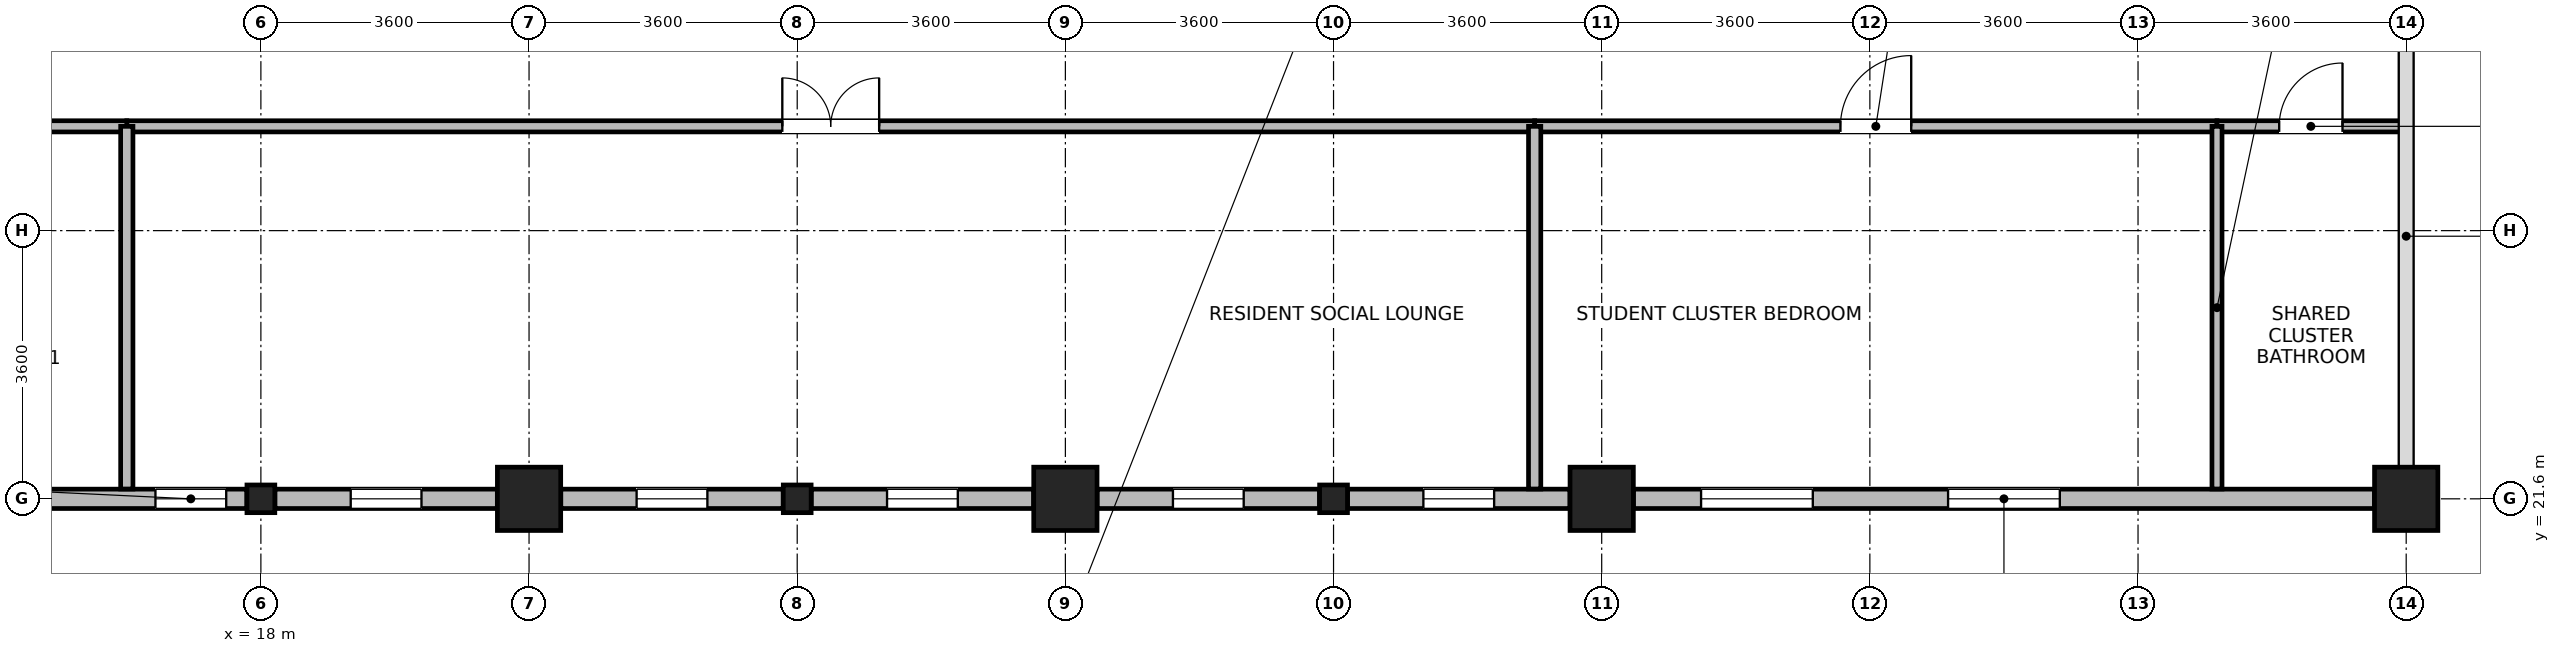
"""IFC4 building model, lengths in metres.
Left out: names, types, materials, properties, quantities, classifications, styles, units other than length and angle.
Written with IfcOpenShell. Run it as: python <this file> out.ifc"""

import sys

from ifc_helpers import new_model, si_unit, direction, frame, frame_2d, origin, origin_2d, place, context, subcontext, project, spatial, rectangle, i_section, extrude, source, transform, mapped, element, fill, save


model = new_model("IFC4")
c1 = context("Model", 3, precision=1e-05, world=origin(), true_north=direction((0.0, 1.0)))
c2 = subcontext(c1, "Body", "Model", "MODEL_VIEW")
j1 = project(units=[si_unit("LENGTHUNIT", "METRE"), si_unit("PLANEANGLEUNIT", "RADIAN")], contexts=[c1])
p1 = place(None, origin())
s1 = spatial("IfcSite", under=j1, at=p1, CompositionType="ELEMENT")
p2 = place(p1, origin())
s2 = spatial("IfcBuilding", under=s1, at=p2, CompositionType="ELEMENT")
p3 = place(p2, frame((0.0, 0.0, 275.8)))
s3 = spatial("IfcBuildingStorey", under=s2, at=p3, CompositionType="ELEMENT", Elevation=275.8)
m1 = source(origin(), c2, "Body", "SweptSolid", [
    extrude(rectangle(XDim=0.85, YDim=0.85, at=origin_2d()), origin(), (0.0, 0.0, 1.0), 3.7),
])
for number, where, z_axis, x_axis in (
    (1, (21.6, 21.6, 0.0), (0.0, 0.0, 1.0), (1.0, 0.0, 0.0)),
    (2, (28.8, 21.6, 0.0), (0.0, 0.0, 1.0), (1.0, 0.0, 0.0)),
    (3, (36.0, 21.6, 0.0), (0.0, 0.0, 1.0), (1.0, 0.0, 0.0)),
    (4, (46.8, 21.6, 0.0), (0.0, 0.0, 1.0), (1.0, 0.0, 0.0)),
):
    element("IfcColumn", number, at=place(p3, frame(where, z_axis=z_axis, x_axis=x_axis)), inside=s3, PredefinedType="COLUMN", context=c2, shape_type="MappedRepresentation", body=[
        mapped(m1, transform((0.0, 0.0, 0.0), x_axis=(1.0, 0.0, 0.0), y_axis=(0.0, 1.0, 0.0), z_axis=(0.0, 0.0, 1.0), scale=1.0)),
    ])
m2 = source(origin(), c2, "Body", "SweptSolid", [
    extrude(i_section(OverallWidth=0.374, OverallDepth=0.372, WebThickness=0.015, FlangeThickness=0.026, FilletRadius=0.015, at=origin_2d()), origin(), (0.0, 0.0, 1.0), 3.7),
])
for number, where, z_axis, x_axis in (
    (5, (18.0, 21.6, 0.0), (0.0, 0.0, 1.0), (1.0, 0.0, 0.0)),
    (6, (25.2, 21.6, 0.0), (0.0, 0.0, 1.0), (1.0, 0.0, 0.0)),
    (7, (32.4, 21.6, 0.0), (0.0, 0.0, 1.0), (1.0, 0.0, 0.0)),
):
    element("IfcColumn", number, at=place(p3, frame(where, z_axis=z_axis, x_axis=x_axis)), inside=s3, PredefinedType="COLUMN", context=c2, shape_type="MappedRepresentation", body=[
        mapped(m2, transform((0.0, 0.0, 0.0), x_axis=(1.0, 0.0, 0.0), y_axis=(0.0, 1.0, 0.0), z_axis=(0.0, 0.0, 1.0), scale=1.0)),
    ])
p4 = place(p3, frame((17.812, 21.6, 0.0), z_axis=(0.0, 0.0, 1.0), x_axis=(-1.0, 0.0, 0.0)))
e8 = element("IfcWall", 8, at=p4, inside=s3, PredefinedType="STANDARD", context=c2, shape_type="SweptSolid", body=[
    extrude(rectangle(XDim=2.986, YDim=0.26, at=frame_2d((1.493, 0.0))), origin(), (0.0, 0.0, 1.0), 3.055),
])
p5 = place(p4, frame((0.278, 0.0, 0.85)))
e9 = element("IfcOpeningElement", 9, at=p5, cuts=e8, PredefinedType="OPENING", context=c2, shape_type="SweptSolid", body=[
    extrude(rectangle(XDim=0.95, YDim=1.75, at=frame_2d((0.475, 0.875))), frame((0.0, 0.14, 0.0), z_axis=(0.0, -1.0, 0.0), x_axis=(1.0, 0.0, 0.0)), (0.0, 0.0, 1.0), 0.28),
])
p6 = place(p3, frame((21.174, 21.6, 0.0), z_axis=(0.0, 0.0, 1.0), x_axis=(-1.0, 0.0, 0.0)))
e10 = element("IfcWall", 10, at=p6, inside=s3, PredefinedType="STANDARD", context=c2, shape_type="SweptSolid", body=[
    extrude(rectangle(XDim=2.986, YDim=0.26, at=frame_2d((1.493, 0.0))), origin(), (0.0, 0.0, 1.0), 3.055),
])
p7 = place(p6, frame((1.018, 0.0, 0.85)))
e11 = element("IfcOpeningElement", 11, at=p7, cuts=e10, PredefinedType="OPENING", context=c2, shape_type="SweptSolid", body=[
    extrude(rectangle(XDim=0.95, YDim=1.75, at=frame_2d((0.475, 0.875))), frame((0.0, 0.14, 0.0), z_axis=(0.0, -1.0, 0.0), x_axis=(1.0, 0.0, 0.0)), (0.0, 0.0, 1.0), 0.28),
])
p8 = place(p3, frame((25.012, 21.6, 0.0), z_axis=(0.0, 0.0, 1.0), x_axis=(-1.0, 0.0, 0.0)))
e12 = element("IfcWall", 12, at=p8, inside=s3, PredefinedType="STANDARD", context=c2, shape_type="SweptSolid", body=[
    extrude(rectangle(XDim=2.986, YDim=0.26, at=frame_2d((1.493, 0.0))), origin(), (0.0, 0.0, 1.0), 3.055),
])
p9 = place(p8, frame((1.018, 0.0, 0.85)))
e13 = element("IfcOpeningElement", 13, at=p9, cuts=e12, PredefinedType="OPENING", context=c2, shape_type="SweptSolid", body=[
    extrude(rectangle(XDim=0.95, YDim=1.75, at=frame_2d((0.475, 0.875))), frame((0.0, 0.14, 0.0), z_axis=(0.0, -1.0, 0.0), x_axis=(1.0, 0.0, 0.0)), (0.0, 0.0, 1.0), 0.28),
])
p10 = place(p3, frame((28.374, 21.6, 0.0), z_axis=(0.0, 0.0, 1.0), x_axis=(-1.0, 0.0, 0.0)))
e14 = element("IfcWall", 14, at=p10, inside=s3, PredefinedType="STANDARD", context=c2, shape_type="SweptSolid", body=[
    extrude(rectangle(XDim=2.986, YDim=0.26, at=frame_2d((1.493, 0.0))), origin(), (0.0, 0.0, 1.0), 3.055),
])
p11 = place(p10, frame((1.018, 0.0, 0.85)))
e15 = element("IfcOpeningElement", 15, at=p11, cuts=e14, PredefinedType="OPENING", context=c2, shape_type="SweptSolid", body=[
    extrude(rectangle(XDim=0.95, YDim=1.75, at=frame_2d((0.475, 0.875))), frame((0.0, 0.14, 0.0), z_axis=(0.0, -1.0, 0.0), x_axis=(1.0, 0.0, 0.0)), (0.0, 0.0, 1.0), 0.28),
])
p12 = place(p3, frame((32.212, 21.6, 0.0), z_axis=(0.0, 0.0, 1.0), x_axis=(-1.0, 0.0, 0.0)))
e16 = element("IfcWall", 16, at=p12, inside=s3, PredefinedType="STANDARD", context=c2, shape_type="SweptSolid", body=[
    extrude(rectangle(XDim=2.986, YDim=0.26, at=frame_2d((1.493, 0.0))), origin(), (0.0, 0.0, 1.0), 3.055),
])
p13 = place(p12, frame((1.018, 0.0, 0.85)))
e17 = element("IfcOpeningElement", 17, at=p13, cuts=e16, PredefinedType="OPENING", context=c2, shape_type="SweptSolid", body=[
    extrude(rectangle(XDim=0.95, YDim=1.75, at=frame_2d((0.475, 0.875))), frame((0.0, 0.14, 0.0), z_axis=(0.0, -1.0, 0.0), x_axis=(1.0, 0.0, 0.0)), (0.0, 0.0, 1.0), 0.28),
])
p14 = place(p3, frame((35.574, 21.6, 0.0), z_axis=(0.0, 0.0, 1.0), x_axis=(-1.0, 0.0, 0.0)))
e18 = element("IfcWall", 18, at=p14, inside=s3, PredefinedType="STANDARD", context=c2, shape_type="SweptSolid", body=[
    extrude(rectangle(XDim=2.986, YDim=0.26, at=frame_2d((1.493, 0.0))), origin(), (0.0, 0.0, 1.0), 3.055),
])
p15 = place(p14, frame((1.018, 0.0, 0.85)))
e19 = element("IfcOpeningElement", 19, at=p15, cuts=e18, PredefinedType="OPENING", context=c2, shape_type="SweptSolid", body=[
    extrude(rectangle(XDim=0.95, YDim=1.75, at=frame_2d((0.475, 0.875))), frame((0.0, 0.14, 0.0), z_axis=(0.0, -1.0, 0.0), x_axis=(1.0, 0.0, 0.0)), (0.0, 0.0, 1.0), 0.28),
])
p16 = place(p3, frame((46.374, 21.6, 0.0), z_axis=(0.0, 0.0, 1.0), x_axis=(-1.0, 0.0, 0.0)))
e20 = element("IfcWall", 20, at=p16, inside=s3, PredefinedType="STANDARD", context=c2, shape_type="SweptSolid", body=[
    extrude(rectangle(XDim=9.948, YDim=0.26, at=frame_2d((4.974, 0.0))), origin(), (0.0, 0.0, 1.0), 3.055),
])
p17 = place(p16, frame((4.224, 0.0, 0.85)))
e21 = element("IfcOpeningElement", 21, at=p17, cuts=e20, PredefinedType="OPENING", context=c2, shape_type="SweptSolid", body=[
    extrude(rectangle(XDim=1.5, YDim=1.85, at=frame_2d((0.75, 0.925))), frame((0.0, 0.14, 0.0), z_axis=(0.0, -1.0, 0.0), x_axis=(1.0, 0.0, 0.0)), (0.0, 0.0, 1.0), 0.28),
])
p18 = place(p16, frame((7.54, 0.0, 0.85)))
e22 = element("IfcOpeningElement", 22, at=p18, cuts=e20, PredefinedType="OPENING", context=c2, shape_type="SweptSolid", body=[
    extrude(rectangle(XDim=1.5, YDim=1.85, at=frame_2d((0.75, 0.925))), frame((0.0, 0.14, 0.0), z_axis=(0.0, -1.0, 0.0), x_axis=(1.0, 0.0, 0.0)), (0.0, 0.0, 1.0), 0.28),
])
p19 = place(p3, frame((16.2, 26.6, 0.0), z_axis=(0.0, 0.0, 1.0), x_axis=(1.0, 0.0, 0.0)))
e23 = element("IfcWall", 23, at=p19, inside=s3, PredefinedType="PARTITIONING", context=c2, shape_type="SweptSolid", body=[
    extrude(rectangle(XDim=18.9, YDim=0.15, at=frame_2d((9.45, 0.0))), origin(), (0.0, 0.0, 1.0), 3.455),
])
p20 = place(p19, frame((8.8, 0.0, 0.0)))
e24 = element("IfcOpeningElement", 24, at=p20, cuts=e23, PredefinedType="OPENING", context=c2, shape_type="SweptSolid", body=[
    extrude(rectangle(XDim=1.3, YDim=2.12, at=frame_2d((0.65, 1.06))), frame((0.0, 0.085, 0.0), z_axis=(0.0, -1.0, 0.0), x_axis=(1.0, 0.0, 0.0)), (0.0, 0.0, 1.0), 0.17),
])
p21 = place(p3, frame((3.732, 26.6, 0.0), z_axis=(0.0, 0.0, 1.0), x_axis=(1.0, 0.0, 0.0)))
e25 = element("IfcWall", 25, at=p21, inside=s3, PredefinedType="PARTITIONING", context=c2, shape_type="SweptSolid", body=[
    extrude(rectangle(XDim=12.468, YDim=0.15, at=frame_2d((6.234, 0.0))), origin(), (0.0, 0.0, 1.0), 3.455),
])
p22 = place(p21, frame((5.584, 0.0, 0.0)))
e26 = element("IfcOpeningElement", 26, at=p22, cuts=e25, PredefinedType="OPENING", context=c2, shape_type="SweptSolid", body=[
    extrude(rectangle(XDim=1.3, YDim=2.12, at=frame_2d((0.65, 1.06))), frame((0.0, 0.085, 0.0), z_axis=(0.0, -1.0, 0.0), x_axis=(1.0, 0.0, 0.0)), (0.0, 0.0, 1.0), 0.17),
])
p23 = place(p3, frame((35.1, 26.6, 0.0), z_axis=(0.0, 0.0, 1.0), x_axis=(1.0, 0.0, 0.0)))
e27 = element("IfcWall", 27, at=p23, inside=s3, PredefinedType="PARTITIONING", context=c2, shape_type="SweptSolid", body=[
    extrude(rectangle(XDim=9.16, YDim=0.15, at=frame_2d((4.58, 0.0))), origin(), (0.0, 0.0, 1.0), 3.455),
])
p24 = place(p23, frame((4.105, 0.0, 0.0)))
e28 = element("IfcOpeningElement", 28, at=p24, cuts=e27, PredefinedType="OPENING", context=c2, shape_type="SweptSolid", body=[
    extrude(rectangle(XDim=0.95, YDim=2.1, at=frame_2d((0.475, 1.05))), frame((0.0, 0.085, 0.0), z_axis=(0.0, -1.0, 0.0), x_axis=(1.0, 0.0, 0.0)), (0.0, 0.0, 1.0), 0.17),
])
p25 = place(p3, frame((44.26, 26.6, 0.0), z_axis=(0.0, 0.0, 1.0), x_axis=(1.0, 0.0, 0.0)))
e29 = element("IfcWall", 29, at=p25, inside=s3, PredefinedType="PARTITIONING", context=c2, shape_type="SweptSolid", body=[
    extrude(rectangle(XDim=2.52, YDim=0.15, at=frame_2d((1.26, 0.0))), origin(), (0.0, 0.0, 1.0), 3.455),
])
p26 = place(p25, frame((0.835, 0.0, 0.0)))
e30 = element("IfcOpeningElement", 30, at=p26, cuts=e29, PredefinedType="OPENING", context=c2, shape_type="SweptSolid", body=[
    extrude(rectangle(XDim=0.85, YDim=2.04, at=frame_2d((0.425, 1.02))), frame((0.0, 0.085, 0.0), z_axis=(0.0, -1.0, 0.0), x_axis=(1.0, 0.0, 0.0)), (0.0, 0.0, 1.0), 0.17),
])
for number, where, z_axis, x_axis in (
    (31, (16.2, 21.732, 0.0), (0.0, 0.0, 1.0), (0.0, 1.0, 0.0)),
    (32, (35.1, 21.732, 0.0), (0.0, 0.0, 1.0), (0.0, 1.0, 0.0)),
):
    element("IfcWall", number, at=place(p3, frame(where, z_axis=z_axis, x_axis=x_axis)), inside=s3, PredefinedType="PARTITIONING", context=c2, shape_type="SweptSolid", body=[
        extrude(rectangle(XDim=4.868, YDim=0.165, at=frame_2d((2.434, 0.0))), origin(), (0.0, 0.0, 1.0), 3.455),
    ])
p27 = place(p3, frame((44.26, 21.732, 0.0), z_axis=(0.0, 0.0, 1.0), x_axis=(0.0, 1.0, 0.0)))
e33 = element("IfcWall", 33, at=p27, inside=s3, PredefinedType="PARTITIONING", context=c2, shape_type="SweptSolid", body=[
    extrude(rectangle(XDim=4.868, YDim=0.135, at=frame_2d((2.434, 0.0))), origin(), (0.0, 0.0, 1.0), 3.455),
])
p28 = place(p5, origin())
e34 = element("IfcWindow", 34, at=p28, inside=s3, PartitioningType="SINGLE_PANEL", PredefinedType="WINDOW", context=c2, shape_type="SweptSolid", body=[
    extrude(rectangle(XDim=0.95, YDim=1.75, at=frame_2d((0.475, 0.875))), frame((0.0, 0.03, 0.0), z_axis=(0.0, -1.0, 0.0), x_axis=(1.0, 0.0, 0.0)), (0.0, 0.0, 1.0), 0.06),
])
fill(e9, e34)
p29 = place(p7, origin())
e35 = element("IfcWindow", 35, at=p29, inside=s3, PartitioningType="SINGLE_PANEL", PredefinedType="WINDOW", context=c2, shape_type="SweptSolid", body=[
    extrude(rectangle(XDim=0.95, YDim=1.75, at=frame_2d((0.475, 0.875))), frame((0.0, 0.03, 0.0), z_axis=(0.0, -1.0, 0.0), x_axis=(1.0, 0.0, 0.0)), (0.0, 0.0, 1.0), 0.06),
])
fill(e11, e35)
p30 = place(p9, origin())
e36 = element("IfcWindow", 36, at=p30, inside=s3, PartitioningType="SINGLE_PANEL", PredefinedType="WINDOW", context=c2, shape_type="SweptSolid", body=[
    extrude(rectangle(XDim=0.95, YDim=1.75, at=frame_2d((0.475, 0.875))), frame((0.0, 0.03, 0.0), z_axis=(0.0, -1.0, 0.0), x_axis=(1.0, 0.0, 0.0)), (0.0, 0.0, 1.0), 0.06),
])
fill(e13, e36)
p31 = place(p11, origin())
e37 = element("IfcWindow", 37, at=p31, inside=s3, PartitioningType="SINGLE_PANEL", PredefinedType="WINDOW", context=c2, shape_type="SweptSolid", body=[
    extrude(rectangle(XDim=0.95, YDim=1.75, at=frame_2d((0.475, 0.875))), frame((0.0, 0.03, 0.0), z_axis=(0.0, -1.0, 0.0), x_axis=(1.0, 0.0, 0.0)), (0.0, 0.0, 1.0), 0.06),
])
fill(e15, e37)
p32 = place(p13, origin())
e38 = element("IfcWindow", 38, at=p32, inside=s3, PartitioningType="SINGLE_PANEL", PredefinedType="WINDOW", context=c2, shape_type="SweptSolid", body=[
    extrude(rectangle(XDim=0.95, YDim=1.75, at=frame_2d((0.475, 0.875))), frame((0.0, 0.03, 0.0), z_axis=(0.0, -1.0, 0.0), x_axis=(1.0, 0.0, 0.0)), (0.0, 0.0, 1.0), 0.06),
])
fill(e17, e38)
p33 = place(p15, origin())
e39 = element("IfcWindow", 39, at=p33, inside=s3, PartitioningType="SINGLE_PANEL", PredefinedType="WINDOW", context=c2, shape_type="SweptSolid", body=[
    extrude(rectangle(XDim=0.95, YDim=1.75, at=frame_2d((0.475, 0.875))), frame((0.0, 0.03, 0.0), z_axis=(0.0, -1.0, 0.0), x_axis=(1.0, 0.0, 0.0)), (0.0, 0.0, 1.0), 0.06),
])
fill(e19, e39)
p34 = place(p17, origin())
e40 = element("IfcWindow", 40, at=p34, inside=s3, PartitioningType="SINGLE_PANEL", PredefinedType="WINDOW", context=c2, shape_type="SweptSolid", body=[
    extrude(rectangle(XDim=1.5, YDim=1.85, at=frame_2d((0.75, 0.925))), frame((0.0, 0.03, 0.0), z_axis=(0.0, -1.0, 0.0), x_axis=(1.0, 0.0, 0.0)), (0.0, 0.0, 1.0), 0.06),
])
fill(e21, e40)
p35 = place(p18, origin())
e41 = element("IfcWindow", 41, at=p35, inside=s3, PartitioningType="SINGLE_PANEL", PredefinedType="WINDOW", context=c2, shape_type="SweptSolid", body=[
    extrude(rectangle(XDim=1.5, YDim=1.85, at=frame_2d((0.75, 0.925))), frame((0.0, 0.03, 0.0), z_axis=(0.0, -1.0, 0.0), x_axis=(1.0, 0.0, 0.0)), (0.0, 0.0, 1.0), 0.06),
])
fill(e22, e41)
p36 = place(p20, origin())
e42 = element("IfcDoor", 42, at=p36, inside=s3, OperationType="DOUBLE_DOOR_SINGLE_SWING", PredefinedType="DOOR", context=c2, shape_type="SweptSolid", body=[
    extrude(rectangle(XDim=1.3, YDim=2.12, at=frame_2d((0.65, 1.06))), frame((0.0, 0.025, 0.0), z_axis=(0.0, -1.0, 0.0), x_axis=(1.0, 0.0, 0.0)), (0.0, 0.0, 1.0), 0.05),
])
fill(e24, e42)
p37 = place(p24, origin())
e43 = element("IfcDoor", 43, at=p37, inside=s3, OperationType="SINGLE_SWING_RIGHT", PredefinedType="DOOR", context=c2, shape_type="SweptSolid", body=[
    extrude(rectangle(XDim=0.95, YDim=2.1, at=frame_2d((0.475, 1.05))), frame((0.0, 0.025, 0.0), z_axis=(0.0, -1.0, 0.0), x_axis=(1.0, 0.0, 0.0)), (0.0, 0.0, 1.0), 0.05),
])
fill(e28, e43)
p38 = place(p26, origin())
e44 = element("IfcDoor", 44, at=p38, inside=s3, OperationType="SINGLE_SWING_RIGHT", PredefinedType="DOOR", context=c2, shape_type="SweptSolid", body=[
    extrude(rectangle(XDim=0.85, YDim=2.04, at=frame_2d((0.425, 1.02))), frame((0.0, 0.025, 0.0), z_axis=(0.0, -1.0, 0.0), x_axis=(1.0, 0.0, 0.0)), (0.0, 0.0, 1.0), 0.05),
])
fill(e30, e44)
save(model, sys.argv[1])
